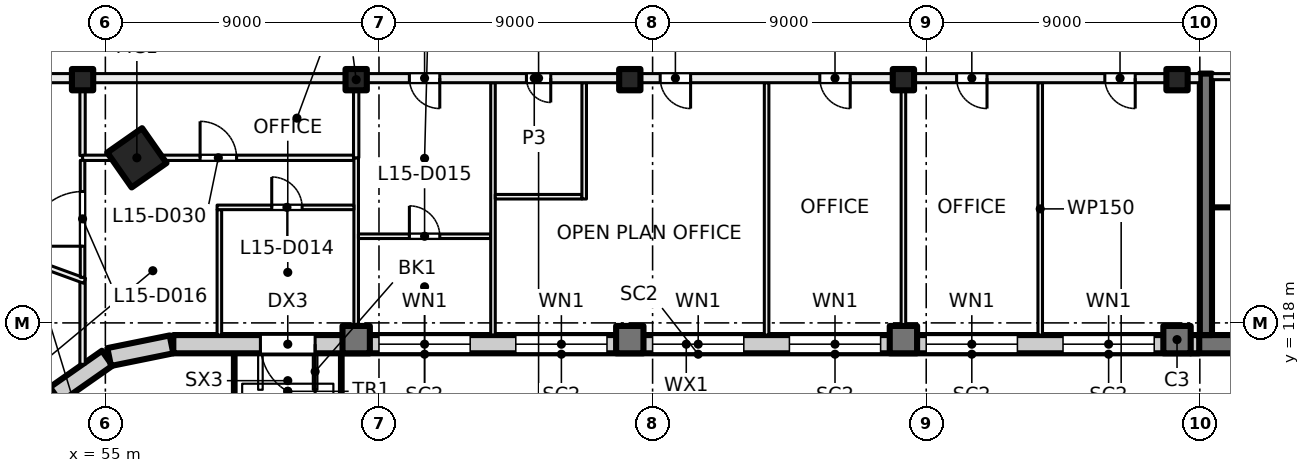
"""IFC4 building model, lengths in metres.
Left out: names, types, materials, properties, quantities, classifications, styles, units other than length and angle.
Written with IfcOpenShell. Run it as: python <this file> out.ifc"""

import sys

from ifc_helpers import new_model, si_unit, direction, frame, frame_2d, origin, origin_2d, place, context, subcontext, project, spatial, rectangle, hollow_rectangle, extrude, element, fill, save


model = new_model("IFC4")
c1 = context("Model", 3, precision=1e-05, world=origin(), true_north=direction((0.0, 1.0)))
c2 = subcontext(c1, "Body", "Model", "MODEL_VIEW")
j1 = project(units=[si_unit("LENGTHUNIT", "METRE"), si_unit("PLANEANGLEUNIT", "RADIAN")], contexts=[c1])
p1 = place(None, origin())
s1 = spatial("IfcSite", under=j1, at=p1, CompositionType="ELEMENT")
p2 = place(p1, origin())
s2 = spatial("IfcBuilding", under=s1, at=p2, CompositionType="ELEMENT")
p3 = place(p2, frame((0.0, 0.0, 67.5)))
s3 = spatial("IfcBuildingStorey", under=s2, at=p3, CompositionType="ELEMENT", Elevation=67.5)
p4 = place(p3, frame((56.036, 123.43, 0.0), z_axis=(0.0, 0.0, 1.0), x_axis=(0.573576436351, -0.819152044289, 0.0)))
e1 = element("IfcColumn", 1, at=p4, inside=s3, PredefinedType="COLUMN", context=c2, shape_type="SweptSolid", body=[
    extrude(hollow_rectangle(XDim=1.4, YDim=1.4, WallThickness=0.04, at=origin_2d()), origin(), (0.0, 0.0, 1.0), 4.0),
])
for number, where, z_axis, x_axis in (
    (2, (54.25, 126.0, 0.0), (0.0, 0.0, 1.0), (1.0, 0.0, 0.0)),
    (3, (63.25, 126.0, 0.0), (0.0, 0.0, 1.0), (1.0, 0.0, 0.0)),
    (4, (72.25, 126.0, 0.0), (0.0, 0.0, 1.0), (1.0, 0.0, 0.0)),
    (5, (81.25, 126.0, 0.0), (0.0, 0.0, 1.0), (1.0, 0.0, 0.0)),
    (6, (90.25, 126.0, 0.0), (0.0, 0.0, 1.0), (1.0, 0.0, 0.0)),
):
    element("IfcColumn", number, at=place(p3, frame(where, z_axis=z_axis, x_axis=x_axis)), inside=s3, PredefinedType="COLUMN", context=c2, shape_type="SweptSolid", body=[
        extrude(rectangle(XDim=0.7, YDim=0.7, at=origin_2d()), origin(), (0.0, 0.0, 1.0), 4.0),
    ])
for number, where, z_axis, x_axis in (
    (7, (63.25, 117.45, 0.0), (0.0, 0.0, 1.0), (1.0, 0.0, 0.0)),
    (8, (72.25, 117.45, 0.0), (0.0, 0.0, 1.0), (1.0, 0.0, 0.0)),
    (9, (81.25, 117.45, 0.0), (0.0, 0.0, 1.0), (1.0, 0.0, 0.0)),
    (10, (90.25, 117.45, 0.0), (0.0, 0.0, 1.0), (1.0, 0.0, 0.0)),
):
    element("IfcColumn", number, at=place(p3, frame(where, z_axis=z_axis, x_axis=x_axis)), inside=s3, PredefinedType="COLUMN", context=c2, shape_type="SweptSolid", body=[
        extrude(rectangle(XDim=0.9, YDim=0.9, at=origin_2d()), origin(), (0.0, 0.0, 1.0), 4.0),
    ])
p5 = place(p3, frame((99.6, 117.3, 0.0), z_axis=(0.0, 0.0, 1.0), x_axis=(-1.0, 0.0, 0.0)))
e11 = element("IfcWall", 11, at=p5, inside=s3, PredefinedType="SHEAR", context=c2, shape_type="SweptSolid", body=[
    extrude(rectangle(XDim=8.9, YDim=0.6, at=frame_2d((4.45, 0.0))), origin(), (0.0, 0.0, 1.0), 4.0),
])
p6 = place(p3, frame((91.2, 126.2, 0.0), z_axis=(0.0, 0.0, 1.0), x_axis=(0.0, -1.0, 0.0)))
e12 = element("IfcWall", 12, at=p6, inside=s3, PredefinedType="SHEAR", context=c2, shape_type="SweptSolid", body=[
    extrude(rectangle(XDim=8.6, YDim=0.4, at=frame_2d((4.3, 0.0))), origin(), (0.0, 0.0, 1.0), 4.0),
])
p7 = place(p3, frame((53.305, 115.578, 0.0), z_axis=(0.0, 0.0, 1.0), x_axis=(-0.522402266438, -0.852699168535, 0.0)))
e13 = element("IfcWall", 13, at=p7, inside=s3, PredefinedType="SOLIDWALL", context=c2, shape_type="SweptSolid", body=[
    extrude(rectangle(XDim=2.042, YDim=0.6, at=frame_2d((1.021, 0.0))), origin(), (0.0, 0.0, 1.0), 3.625),
])
for number, where, z_axis, x_axis in (
    (14, (55.062, 116.839, 0.0), (0.0, 0.0, 1.0), (-0.819, -0.574, 0.0)),
    (15, (57.175, 117.294, 0.0), (0.0, 0.0, 1.0), (-0.98, -0.199, 0.0)),
):
    element("IfcWall", number, at=place(p3, frame(where, z_axis=z_axis, x_axis=x_axis)), inside=s3, PredefinedType="SOLIDWALL", context=c2, shape_type="SweptSolid", body=[
        extrude(rectangle(XDim=2.092, YDim=0.6, at=frame_2d((1.046, 0.0))), origin(), (0.0, 0.0, 1.0), 3.625),
    ])
p8 = place(p3, frame((90.98, 117.3, 0.0), z_axis=(0.0, 0.0, 1.0), x_axis=(-1.0, 0.0, 0.0)))
e16 = element("IfcWall", 16, at=p8, inside=s3, PredefinedType="SOLIDWALL", context=c2, shape_type="SweptSolid", body=[
    extrude(rectangle(XDim=33.745, YDim=0.6, at=frame_2d((16.873, 0.0))), origin(), (0.0, 0.0, 1.0), 3.625),
])
p9 = place(p8, frame((1.48, 0.0, 0.9)))
e17 = element("IfcOpeningElement", 17, at=p9, cuts=e16, PredefinedType="OPENING", context=c2, shape_type="SweptSolid", body=[
    extrude(rectangle(XDim=3.0, YDim=2.4, at=frame_2d((1.5, 1.2))), frame((0.0, 0.31, 0.0), z_axis=(0.0, -1.0, 0.0), x_axis=(1.0, 0.0, 0.0)), (0.0, 0.0, 1.0), 0.62),
])
p10 = place(p8, frame((5.98, 0.0, 0.9)))
e18 = element("IfcOpeningElement", 18, at=p10, cuts=e16, PredefinedType="OPENING", context=c2, shape_type="SweptSolid", body=[
    extrude(rectangle(XDim=3.0, YDim=2.4, at=frame_2d((1.5, 1.2))), frame((0.0, 0.31, 0.0), z_axis=(0.0, -1.0, 0.0), x_axis=(1.0, 0.0, 0.0)), (0.0, 0.0, 1.0), 0.62),
])
p11 = place(p8, frame((10.48, 0.0, 0.9)))
e19 = element("IfcOpeningElement", 19, at=p11, cuts=e16, PredefinedType="OPENING", context=c2, shape_type="SweptSolid", body=[
    extrude(rectangle(XDim=3.0, YDim=2.4, at=frame_2d((1.5, 1.2))), frame((0.0, 0.31, 0.0), z_axis=(0.0, -1.0, 0.0), x_axis=(1.0, 0.0, 0.0)), (0.0, 0.0, 1.0), 0.62),
])
p12 = place(p8, frame((14.98, 0.0, 0.9)))
e20 = element("IfcOpeningElement", 20, at=p12, cuts=e16, PredefinedType="OPENING", context=c2, shape_type="SweptSolid", body=[
    extrude(rectangle(XDim=3.0, YDim=2.4, at=frame_2d((1.5, 1.2))), frame((0.0, 0.31, 0.0), z_axis=(0.0, -1.0, 0.0), x_axis=(1.0, 0.0, 0.0)), (0.0, 0.0, 1.0), 0.62),
])
p13 = place(p8, frame((19.48, 0.0, 0.9)))
e21 = element("IfcOpeningElement", 21, at=p13, cuts=e16, PredefinedType="OPENING", context=c2, shape_type="SweptSolid", body=[
    extrude(rectangle(XDim=3.0, YDim=2.4, at=frame_2d((1.5, 1.2))), frame((0.0, 0.31, 0.0), z_axis=(0.0, -1.0, 0.0), x_axis=(1.0, 0.0, 0.0)), (0.0, 0.0, 1.0), 0.62),
])
p14 = place(p8, frame((23.98, 0.0, 0.9)))
e22 = element("IfcOpeningElement", 22, at=p14, cuts=e16, PredefinedType="OPENING", context=c2, shape_type="SweptSolid", body=[
    extrude(rectangle(XDim=3.0, YDim=2.4, at=frame_2d((1.5, 1.2))), frame((0.0, 0.31, 0.0), z_axis=(0.0, -1.0, 0.0), x_axis=(1.0, 0.0, 0.0)), (0.0, 0.0, 1.0), 0.62),
])
p15 = place(p8, frame((29.08, 0.0, 0.0)))
e23 = element("IfcOpeningElement", 23, at=p15, cuts=e16, PredefinedType="OPENING", context=c2, shape_type="SweptSolid", body=[
    extrude(rectangle(XDim=1.8, YDim=2.4, at=frame_2d((0.9, 1.2))), frame((0.0, 0.31, 0.0), z_axis=(0.0, -1.0, 0.0), x_axis=(1.0, 0.0, 0.0)), (0.0, 0.0, 1.0), 0.62),
])
p16 = place(p3, frame((95.2, 126.1, 0.0), z_axis=(0.0, 0.0, 1.0), x_axis=(-1.0, 0.0, 0.0)))
e24 = element("IfcWall", 24, at=p16, inside=s3, PredefinedType="PARTITIONING", context=c2, shape_type="SweptSolid", body=[
    extrude(rectangle(XDim=3.8, YDim=0.2, at=frame_2d((1.9, 0.0))), origin(), (0.0, 0.0, 1.0), 3.625),
])
p17 = place(p16, frame((0.3, 0.0, 0.0)))
e25 = element("IfcOpeningElement", 25, at=p17, cuts=e24, PredefinedType="OPENING", context=c2, shape_type="SweptSolid", body=[
    extrude(rectangle(XDim=1.2, YDim=2.1, at=frame_2d((0.6, 1.05))), frame((0.0, 0.11, 0.0), z_axis=(0.0, -1.0, 0.0), x_axis=(1.0, 0.0, 0.0)), (0.0, 0.0, 1.0), 0.22),
])
p18 = place(p3, frame((93.35, 121.8, 0.0), z_axis=(0.0, 0.0, 1.0), x_axis=(-1.0, 0.0, 0.0)))
e26 = element("IfcWall", 26, at=p18, inside=s3, PredefinedType="PARTITIONING", context=c2, shape_type="SweptSolid", body=[
    extrude(rectangle(XDim=1.95, YDim=0.1, at=frame_2d((0.975, 0.0))), origin(), (0.0, 0.0, 1.0), 3.625),
])
p19 = place(p3, frame((54.25, 116.637, 0.0), z_axis=(0.0, 0.0, 1.0), x_axis=(0.0, 1.0, 0.0)))
e27 = element("IfcWall", 27, at=p19, inside=s3, PredefinedType="PARTITIONING", context=c2, shape_type="SweptSolid", body=[
    extrude(rectangle(XDim=2.776, YDim=0.175, at=frame_2d((1.388, 0.0))), origin(), (0.0, 0.0, 1.0), 3.625),
])
p20 = place(p3, frame((54.32, 119.384, 0.0), z_axis=(0.0, 0.0, 1.0), x_axis=(-0.939632908118, 0.342184157994, 0.0)))
e28 = element("IfcWall", 28, at=p20, inside=s3, PredefinedType="PARTITIONING", context=c2, shape_type="SweptSolid", body=[
    extrude(rectangle(XDim=8.665, YDim=0.175, at=frame_2d((4.333, 0.0))), origin(), (0.0, 0.0, 1.0), 3.625),
])
p21 = place(p3, frame((54.25, 123.502, 0.0), z_axis=(0.0, 0.0, 1.0), x_axis=(0.0, 1.0, 0.0)))
e29 = element("IfcWall", 29, at=p21, inside=s3, PredefinedType="PARTITIONING", context=c2, shape_type="SweptSolid", body=[
    extrude(rectangle(XDim=2.398, YDim=0.175, at=frame_2d((1.199, 0.0))), origin(), (0.0, 0.0, 1.0), 3.625),
])
p22 = place(p3, frame((54.25, 123.43, 0.0), z_axis=(0.0, 0.0, 1.0), x_axis=(1.0, 0.0, 0.0)))
e30 = element("IfcWall", 30, at=p22, inside=s3, PredefinedType="PARTITIONING", context=c2, shape_type="SweptSolid", body=[
    extrude(rectangle(XDim=8.912, YDim=0.175, at=frame_2d((4.456, 0.0))), origin(), (0.0, 0.0, 1.0), 3.625),
])
p23 = place(p22, frame((3.866, 0.0, 0.0)))
e31 = element("IfcOpeningElement", 31, at=p23, cuts=e30, PredefinedType="OPENING", context=c2, shape_type="SweptSolid", body=[
    extrude(rectangle(XDim=1.2, YDim=2.1, at=frame_2d((0.6, 1.05))), frame((0.0, 0.097, 0.0), z_axis=(0.0, -1.0, 0.0), x_axis=(1.0, 0.0, 0.0)), (0.0, 0.0, 1.0), 0.195),
])
p24 = place(p3, frame((54.25, 119.498, 0.0), z_axis=(0.0, 0.0, 1.0), x_axis=(0.0, 1.0, 0.0)))
e32 = element("IfcWall", 32, at=p24, inside=s3, PredefinedType="PARTITIONING", context=c2, shape_type="SweptSolid", body=[
    extrude(rectangle(XDim=3.848, YDim=0.15, at=frame_2d((1.924, 0.0))), origin(), (0.0, 0.0, 1.0), 3.625),
])
p25 = place(p24, frame((1.024, 0.0, 0.0)))
e33 = element("IfcOpeningElement", 33, at=p25, cuts=e32, PredefinedType="OPENING", context=c2, shape_type="SweptSolid", body=[
    extrude(rectangle(XDim=1.8, YDim=2.1, at=frame_2d((0.9, 1.05))), frame((0.0, 0.085, 0.0), z_axis=(0.0, -1.0, 0.0), x_axis=(1.0, 0.0, 0.0)), (0.0, 0.0, 1.0), 0.17),
])
p26 = place(p3, frame((58.75, 117.6, 0.0), z_axis=(0.0, 0.0, 1.0), x_axis=(0.0, 1.0, 0.0)))
e34 = element("IfcWall", 34, at=p26, inside=s3, PredefinedType="PARTITIONING", context=c2, shape_type="SweptSolid", body=[
    extrude(rectangle(XDim=4.125, YDim=0.15, at=frame_2d((2.062, 0.0))), origin(), (0.0, 0.0, 1.0), 3.625),
])
p27 = place(p3, frame((63.25, 117.6, 0.0), z_axis=(0.0, 0.0, 1.0), x_axis=(0.0, 1.0, 0.0)))
e35 = element("IfcWall", 35, at=p27, inside=s3, PredefinedType="PARTITIONING", context=c2, shape_type="SweptSolid", body=[
    extrude(rectangle(XDim=5.83, YDim=0.15, at=frame_2d((2.915, 0.0))), origin(), (0.0, 0.0, 1.0), 3.625),
])
p28 = place(p3, frame((63.325, 120.85, 0.0), z_axis=(0.0, 0.0, 1.0), x_axis=(1.0, 0.0, 0.0)))
e36 = element("IfcWall", 36, at=p28, inside=s3, PredefinedType="PARTITIONING", context=c2, shape_type="SweptSolid", body=[
    extrude(rectangle(XDim=4.35, YDim=0.15, at=frame_2d((2.175, 0.0))), origin(), (0.0, 0.0, 1.0), 3.625),
])
p29 = place(p28, frame((1.675, 0.0, 0.0)))
e37 = element("IfcOpeningElement", 37, at=p29, cuts=e36, PredefinedType="OPENING", context=c2, shape_type="SweptSolid", body=[
    extrude(rectangle(XDim=1.0, YDim=2.1, at=frame_2d((0.5, 1.05))), frame((0.0, 0.085, 0.0), z_axis=(0.0, -1.0, 0.0), x_axis=(1.0, 0.0, 0.0)), (0.0, 0.0, 1.0), 0.17),
])
p30 = place(p3, frame((58.675, 121.8, 0.0), z_axis=(0.0, 0.0, 1.0), x_axis=(1.0, 0.0, 0.0)))
e38 = element("IfcWall", 38, at=p30, inside=s3, PredefinedType="PARTITIONING", context=c2, shape_type="SweptSolid", body=[
    extrude(rectangle(XDim=4.5, YDim=0.15, at=frame_2d((2.25, 0.0))), origin(), (0.0, 0.0, 1.0), 3.625),
])
p31 = place(p30, frame((1.798, 0.0, 0.0)))
e39 = element("IfcOpeningElement", 39, at=p31, cuts=e38, PredefinedType="OPENING", context=c2, shape_type="SweptSolid", body=[
    extrude(rectangle(XDim=1.0, YDim=2.1, at=frame_2d((0.5, 1.05))), frame((0.0, 0.085, 0.0), z_axis=(0.0, -1.0, 0.0), x_axis=(1.0, 0.0, 0.0)), (0.0, 0.0, 1.0), 0.17),
])
p32 = place(p3, frame((63.25, 123.43, 0.0), z_axis=(0.0, 0.0, 1.0), x_axis=(0.0, 1.0, 0.0)))
e40 = element("IfcWall", 40, at=p32, inside=s3, PredefinedType="PARTITIONING", context=c2, shape_type="SweptSolid", body=[
    extrude(rectangle(XDim=2.47, YDim=0.175, at=frame_2d((1.235, 0.0))), origin(), (0.0, 0.0, 1.0), 3.625),
])
p33 = place(p3, frame((67.75, 117.6, 0.0), z_axis=(0.0, 0.0, 1.0), x_axis=(0.0, 1.0, 0.0)))
e41 = element("IfcWall", 41, at=p33, inside=s3, PredefinedType="PARTITIONING", context=c2, shape_type="SweptSolid", body=[
    extrude(rectangle(XDim=8.3, YDim=0.15, at=frame_2d((4.15, 0.0))), origin(), (0.0, 0.0, 1.0), 3.625),
])
p34 = place(p3, frame((70.675, 122.15, 0.0), z_axis=(0.0, 0.0, 1.0), x_axis=(-1.0, 0.0, 0.0)))
e42 = element("IfcWall", 42, at=p34, inside=s3, PredefinedType="PARTITIONING", context=c2, shape_type="SweptSolid", body=[
    extrude(rectangle(XDim=2.85, YDim=0.15, at=frame_2d((1.425, 0.0))), origin(), (0.0, 0.0, 1.0), 3.625),
])
p35 = place(p3, frame((70.75, 125.9, 0.0), z_axis=(0.0, 0.0, 1.0), x_axis=(0.0, -1.0, 0.0)))
e43 = element("IfcWall", 43, at=p35, inside=s3, PredefinedType="PARTITIONING", context=c2, shape_type="SweptSolid", body=[
    extrude(rectangle(XDim=3.825, YDim=0.15, at=frame_2d((1.913, 0.0))), origin(), (0.0, 0.0, 1.0), 3.625),
])
for number, where, z_axis, x_axis in (
    (44, (76.75, 117.6, 0.0), (0.0, 0.0, 1.0), (0.0, 1.0, 0.0)),
    (45, (81.25, 117.6, 0.0), (0.0, 0.0, 1.0), (0.0, 1.0, 0.0)),
    (46, (85.75, 117.6, 0.0), (0.0, 0.0, 1.0), (0.0, 1.0, 0.0)),
):
    element("IfcWall", number, at=place(p3, frame(where, z_axis=z_axis, x_axis=x_axis)), inside=s3, PredefinedType="PARTITIONING", context=c2, shape_type="SweptSolid", body=[
        extrude(rectangle(XDim=8.3, YDim=0.15, at=frame_2d((4.15, 0.0))), origin(), (0.0, 0.0, 1.0), 3.625),
    ])
p36 = place(p3, frame((91.0, 126.05, 0.0), z_axis=(0.0, 0.0, 1.0), x_axis=(-1.0, 0.0, 0.0)))
e47 = element("IfcWall", 47, at=p36, inside=s3, PredefinedType="PARTITIONING", context=c2, shape_type="SweptSolid", body=[
    extrude(rectangle(XDim=43.785, YDim=0.3, at=frame_2d((21.893, 0.0))), origin(), (0.0, 0.0, 1.0), 3.625),
])
p37 = place(p36, frame((2.125, 0.0, 0.0)))
e48 = element("IfcOpeningElement", 48, at=p37, cuts=e47, PredefinedType="OPENING", context=c2, shape_type="SweptSolid", body=[
    extrude(rectangle(XDim=1.0, YDim=2.1, at=frame_2d((0.5, 1.05))), frame((0.0, 0.16, 0.0), z_axis=(0.0, -1.0, 0.0), x_axis=(1.0, 0.0, 0.0)), (0.0, 0.0, 1.0), 0.32),
])
p38 = place(p36, frame((7.0, 0.0, 0.0)))
e49 = element("IfcOpeningElement", 49, at=p38, cuts=e47, PredefinedType="OPENING", context=c2, shape_type="SweptSolid", body=[
    extrude(rectangle(XDim=1.0, YDim=2.1, at=frame_2d((0.5, 1.05))), frame((0.0, 0.16, 0.0), z_axis=(0.0, -1.0, 0.0), x_axis=(1.0, 0.0, 0.0)), (0.0, 0.0, 1.0), 0.32),
])
p39 = place(p36, frame((11.5, 0.0, 0.0)))
e50 = element("IfcOpeningElement", 50, at=p39, cuts=e47, PredefinedType="OPENING", context=c2, shape_type="SweptSolid", body=[
    extrude(rectangle(XDim=1.0, YDim=2.1, at=frame_2d((0.5, 1.05))), frame((0.0, 0.16, 0.0), z_axis=(0.0, -1.0, 0.0), x_axis=(1.0, 0.0, 0.0)), (0.0, 0.0, 1.0), 0.32),
])
p40 = place(p36, frame((21.35, 0.0, 0.0)))
e51 = element("IfcOpeningElement", 51, at=p40, cuts=e47, PredefinedType="OPENING", context=c2, shape_type="SweptSolid", body=[
    extrude(rectangle(XDim=0.8, YDim=2.1, at=frame_2d((0.4, 1.05))), frame((0.0, 0.16, 0.0), z_axis=(0.0, -1.0, 0.0), x_axis=(1.0, 0.0, 0.0)), (0.0, 0.0, 1.0), 0.32),
])
p41 = place(p36, frame((16.75, 0.0, 0.0)))
e52 = element("IfcOpeningElement", 52, at=p41, cuts=e47, PredefinedType="OPENING", context=c2, shape_type="SweptSolid", body=[
    extrude(rectangle(XDim=1.0, YDim=2.1, at=frame_2d((0.5, 1.05))), frame((0.0, 0.16, 0.0), z_axis=(0.0, -1.0, 0.0), x_axis=(1.0, 0.0, 0.0)), (0.0, 0.0, 1.0), 0.32),
])
p42 = place(p36, frame((25.0, 0.0, 0.0)))
e53 = element("IfcOpeningElement", 53, at=p42, cuts=e47, PredefinedType="OPENING", context=c2, shape_type="SweptSolid", body=[
    extrude(rectangle(XDim=1.0, YDim=2.1, at=frame_2d((0.5, 1.05))), frame((0.0, 0.16, 0.0), z_axis=(0.0, -1.0, 0.0), x_axis=(1.0, 0.0, 0.0)), (0.0, 0.0, 1.0), 0.32),
])
p43 = place(p36, frame((39.296, 0.0, 0.0)))
e54 = element("IfcOpeningElement", 54, at=p43, cuts=e47, PredefinedType="OPENING", context=c2, shape_type="SweptSolid", body=[
    extrude(rectangle(XDim=1.8, YDim=2.1, at=frame_2d((0.9, 1.05))), frame((0.0, 0.16, 0.0), z_axis=(0.0, -1.0, 0.0), x_axis=(1.0, 0.0, 0.0)), (0.0, 0.0, 1.0), 0.32),
])
p44 = place(p9, origin())
e55 = element("IfcWindow", 55, at=p44, inside=s3, PartitioningType="SINGLE_PANEL", PredefinedType="WINDOW", context=c2, shape_type="SweptSolid", body=[
    extrude(rectangle(XDim=3.0, YDim=2.4, at=frame_2d((1.5, 1.2))), frame((0.0, 0.03, 0.0), z_axis=(0.0, -1.0, 0.0), x_axis=(1.0, 0.0, 0.0)), (0.0, 0.0, 1.0), 0.06),
])
fill(e17, e55)
p45 = place(p10, origin())
e56 = element("IfcWindow", 56, at=p45, inside=s3, PartitioningType="SINGLE_PANEL", PredefinedType="WINDOW", context=c2, shape_type="SweptSolid", body=[
    extrude(rectangle(XDim=3.0, YDim=2.4, at=frame_2d((1.5, 1.2))), frame((0.0, 0.03, 0.0), z_axis=(0.0, -1.0, 0.0), x_axis=(1.0, 0.0, 0.0)), (0.0, 0.0, 1.0), 0.06),
])
fill(e18, e56)
p46 = place(p11, origin())
e57 = element("IfcWindow", 57, at=p46, inside=s3, PartitioningType="SINGLE_PANEL", PredefinedType="WINDOW", context=c2, shape_type="SweptSolid", body=[
    extrude(rectangle(XDim=3.0, YDim=2.4, at=frame_2d((1.5, 1.2))), frame((0.0, 0.03, 0.0), z_axis=(0.0, -1.0, 0.0), x_axis=(1.0, 0.0, 0.0)), (0.0, 0.0, 1.0), 0.06),
])
fill(e19, e57)
p47 = place(p12, origin())
e58 = element("IfcWindow", 58, at=p47, inside=s3, PartitioningType="SINGLE_PANEL", PredefinedType="WINDOW", context=c2, shape_type="SweptSolid", body=[
    extrude(rectangle(XDim=3.0, YDim=2.4, at=frame_2d((1.5, 1.2))), frame((0.0, 0.03, 0.0), z_axis=(0.0, -1.0, 0.0), x_axis=(1.0, 0.0, 0.0)), (0.0, 0.0, 1.0), 0.06),
])
fill(e20, e58)
p48 = place(p13, origin())
e59 = element("IfcWindow", 59, at=p48, inside=s3, PartitioningType="SINGLE_PANEL", PredefinedType="WINDOW", context=c2, shape_type="SweptSolid", body=[
    extrude(rectangle(XDim=3.0, YDim=2.4, at=frame_2d((1.5, 1.2))), frame((0.0, 0.03, 0.0), z_axis=(0.0, -1.0, 0.0), x_axis=(1.0, 0.0, 0.0)), (0.0, 0.0, 1.0), 0.06),
])
fill(e21, e59)
p49 = place(p14, origin())
e60 = element("IfcWindow", 60, at=p49, inside=s3, PartitioningType="SINGLE_PANEL", PredefinedType="WINDOW", context=c2, shape_type="SweptSolid", body=[
    extrude(rectangle(XDim=3.0, YDim=2.4, at=frame_2d((1.5, 1.2))), frame((0.0, 0.03, 0.0), z_axis=(0.0, -1.0, 0.0), x_axis=(1.0, 0.0, 0.0)), (0.0, 0.0, 1.0), 0.06),
])
fill(e22, e60)
p50 = place(p15, origin())
e61 = element("IfcDoor", 61, at=p50, inside=s3, OperationType="DOUBLE_DOOR_SINGLE_SWING", PredefinedType="DOOR", context=c2, shape_type="SweptSolid", body=[
    extrude(rectangle(XDim=1.8, YDim=2.4, at=frame_2d((0.9, 1.2))), frame((0.0, 0.025, 0.0), z_axis=(0.0, -1.0, 0.0), x_axis=(1.0, 0.0, 0.0)), (0.0, 0.0, 1.0), 0.05),
])
fill(e23, e61)
p51 = place(p37, origin())
e62 = element("IfcDoor", 62, at=p51, inside=s3, OperationType="SINGLE_SWING_LEFT", PredefinedType="DOOR", context=c2, shape_type="SweptSolid", body=[
    extrude(rectangle(XDim=1.0, YDim=2.1, at=frame_2d((0.5, 1.05))), frame((0.0, 0.025, 0.0), z_axis=(0.0, -1.0, 0.0), x_axis=(1.0, 0.0, 0.0)), (0.0, 0.0, 1.0), 0.05),
])
fill(e48, e62)
p52 = place(p38, origin())
e63 = element("IfcDoor", 63, at=p52, inside=s3, OperationType="SINGLE_SWING_RIGHT", PredefinedType="DOOR", context=c2, shape_type="SweptSolid", body=[
    extrude(rectangle(XDim=1.0, YDim=2.1, at=frame_2d((0.5, 1.05))), frame((0.0, 0.025, 0.0), z_axis=(0.0, -1.0, 0.0), x_axis=(1.0, 0.0, 0.0)), (0.0, 0.0, 1.0), 0.05),
])
fill(e49, e63)
p53 = place(p39, origin())
e64 = element("IfcDoor", 64, at=p53, inside=s3, OperationType="SINGLE_SWING_LEFT", PredefinedType="DOOR", context=c2, shape_type="SweptSolid", body=[
    extrude(rectangle(XDim=1.0, YDim=2.1, at=frame_2d((0.5, 1.05))), frame((0.0, 0.025, 0.0), z_axis=(0.0, -1.0, 0.0), x_axis=(1.0, 0.0, 0.0)), (0.0, 0.0, 1.0), 0.05),
])
fill(e50, e64)
p54 = place(p40, origin())
e65 = element("IfcDoor", 65, at=p54, inside=s3, OperationType="SINGLE_SWING_LEFT", PredefinedType="DOOR", context=c2, shape_type="SweptSolid", body=[
    extrude(rectangle(XDim=0.8, YDim=2.1, at=frame_2d((0.4, 1.05))), frame((0.0, 0.025, 0.0), z_axis=(0.0, -1.0, 0.0), x_axis=(1.0, 0.0, 0.0)), (0.0, 0.0, 1.0), 0.05),
])
fill(e51, e65)
p55 = place(p41, origin())
e66 = element("IfcDoor", 66, at=p55, inside=s3, OperationType="SINGLE_SWING_LEFT", PredefinedType="DOOR", context=c2, shape_type="SweptSolid", body=[
    extrude(rectangle(XDim=1.0, YDim=2.1, at=frame_2d((0.5, 1.05))), frame((0.0, 0.025, 0.0), z_axis=(0.0, -1.0, 0.0), x_axis=(1.0, 0.0, 0.0)), (0.0, 0.0, 1.0), 0.05),
])
fill(e52, e66)
p56 = place(p42, origin())
e67 = element("IfcDoor", 67, at=p56, inside=s3, OperationType="SINGLE_SWING_LEFT", PredefinedType="DOOR", context=c2, shape_type="SweptSolid", body=[
    extrude(rectangle(XDim=1.0, YDim=2.1, at=frame_2d((0.5, 1.05))), frame((0.0, 0.025, 0.0), z_axis=(0.0, -1.0, 0.0), x_axis=(1.0, 0.0, 0.0)), (0.0, 0.0, 1.0), 0.05),
])
fill(e53, e67)
p57 = place(p31, origin())
e68 = element("IfcDoor", 68, at=p57, inside=s3, OperationType="SINGLE_SWING_LEFT", PredefinedType="DOOR", context=c2, shape_type="SweptSolid", body=[
    extrude(rectangle(XDim=1.0, YDim=2.1, at=frame_2d((0.5, 1.05))), frame((0.0, 0.025, 0.0), z_axis=(0.0, -1.0, 0.0), x_axis=(1.0, 0.0, 0.0)), (0.0, 0.0, 1.0), 0.05),
])
fill(e39, e68)
p58 = place(p29, origin())
e69 = element("IfcDoor", 69, at=p58, inside=s3, OperationType="SINGLE_SWING_LEFT", PredefinedType="DOOR", context=c2, shape_type="SweptSolid", body=[
    extrude(rectangle(XDim=1.0, YDim=2.1, at=frame_2d((0.5, 1.05))), frame((0.0, 0.025, 0.0), z_axis=(0.0, -1.0, 0.0), x_axis=(1.0, 0.0, 0.0)), (0.0, 0.0, 1.0), 0.05),
])
fill(e37, e69)
p59 = place(p25, origin())
e70 = element("IfcDoor", 70, at=p59, inside=s3, OperationType="DOUBLE_DOOR_SINGLE_SWING", PredefinedType="DOOR", context=c2, shape_type="SweptSolid", body=[
    extrude(rectangle(XDim=1.8, YDim=2.1, at=frame_2d((0.9, 1.05))), frame((0.0, 0.025, 0.0), z_axis=(0.0, -1.0, 0.0), x_axis=(1.0, 0.0, 0.0)), (0.0, 0.0, 1.0), 0.05),
])
fill(e33, e70)
p60 = place(p23, origin())
e71 = element("IfcDoor", 71, at=p60, inside=s3, OperationType="DOUBLE_DOOR_SINGLE_SWING", PredefinedType="DOOR", context=c2, shape_type="SweptSolid", body=[
    extrude(rectangle(XDim=1.2, YDim=2.1, at=frame_2d((0.6, 1.05))), frame((0.0, 0.025, 0.0), z_axis=(0.0, -1.0, 0.0), x_axis=(1.0, 0.0, 0.0)), (0.0, 0.0, 1.0), 0.05),
])
fill(e31, e71)
save(model, sys.argv[1])
